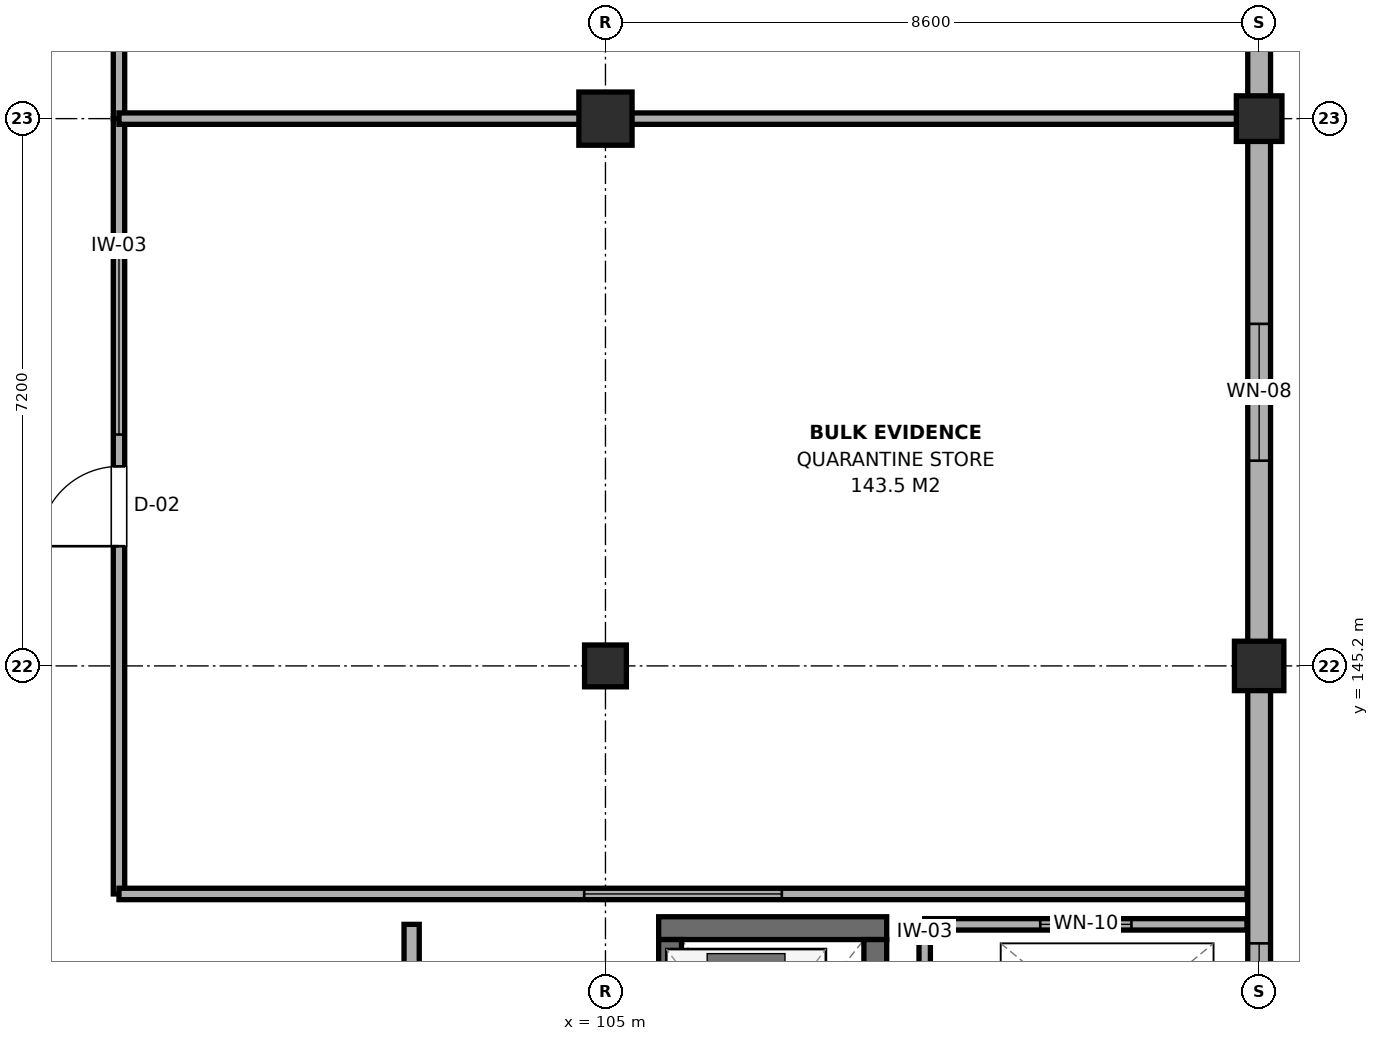
"""IFC4 building model, lengths in metres.
Left out: names, types, materials, properties, quantities, classifications, styles, units other than length and angle.
Written with IfcOpenShell. Run it as: python <this file> out.ifc"""

import sys

from ifc_helpers import new_model, si_unit, direction, frame, frame_2d, origin, origin_2d, place, context, subcontext, project, spatial, rectangle, extrude, element, fill, save


model = new_model("IFC4")
c1 = context("Model", 3, precision=1e-05, world=origin(), true_north=direction((0.0, 1.0)))
c2 = subcontext(c1, "Body", "Model", "MODEL_VIEW")
j1 = project(units=[si_unit("LENGTHUNIT", "METRE"), si_unit("PLANEANGLEUNIT", "RADIAN")], contexts=[c1])
p1 = place(None, origin())
s1 = spatial("IfcSite", under=j1, at=p1, CompositionType="ELEMENT")
p2 = place(p1, origin())
s2 = spatial("IfcBuilding", under=s1, at=p2, CompositionType="ELEMENT")
p3 = place(p2, origin())
s3 = spatial("IfcBuildingStorey", under=s2, at=p3, CompositionType="ELEMENT", Elevation=0.0)
p4 = place(p3, frame((105.0, 145.2, 0.0), z_axis=(0.0, 0.0, 1.0), x_axis=(1.0, 0.0, 0.0)))
e1 = element("IfcColumn", 1, at=p4, inside=s3, PredefinedType="COLUMN", context=c2, shape_type="SweptSolid", body=[
    extrude(rectangle(XDim=0.55, YDim=0.55, at=origin_2d()), origin(), (0.0, 0.0, 1.0), 4.8),
])
p5 = place(p3, frame((105.0, 152.4, 0.0), z_axis=(0.0, 0.0, 1.0), x_axis=(1.0, 0.0, 0.0)))
e2 = element("IfcColumn", 2, at=p5, inside=s3, PredefinedType="COLUMN", context=c2, shape_type="SweptSolid", body=[
    extrude(rectangle(XDim=0.7, YDim=0.7, at=origin_2d()), origin(), (0.0, 0.0, 1.0), 4.8),
])
p6 = place(p3, frame((113.6, 145.2, 0.0), z_axis=(0.0, 0.0, 1.0), x_axis=(1.0, 0.0, 0.0)))
e3 = element("IfcColumn", 3, at=p6, inside=s3, PredefinedType="COLUMN", context=c2, shape_type="SweptSolid", body=[
    extrude(rectangle(XDim=0.65, YDim=0.65, at=origin_2d()), origin(), (0.0, 0.0, 1.0), 4.8),
])
p7 = place(p3, frame((113.6, 152.4, 0.0), z_axis=(0.0, 0.0, 1.0), x_axis=(1.0, 0.0, 0.0)))
e4 = element("IfcColumn", 4, at=p7, inside=s3, PredefinedType="COLUMN", context=c2, shape_type="SweptSolid", body=[
    extrude(rectangle(XDim=0.6, YDim=0.6, at=origin_2d()), origin(), (0.0, 0.0, 1.0), 4.8),
])
p8 = place(p3, frame((105.7, 141.75, 0.0), z_axis=(0.0, 0.0, 1.0), x_axis=(1.0, 0.0, 0.0)))
e5 = element("IfcWall", 5, at=p8, inside=s3, PredefinedType="SHEAR", context=c2, shape_type="SweptSolid", body=[
    extrude(rectangle(XDim=3.0, YDim=0.3, at=frame_2d((1.5, 0.0))), origin(), (0.0, 0.0, 1.0), 4.56),
])
p9 = place(p3, frame((105.85, 138.6, 0.0), z_axis=(0.0, 0.0, 1.0), x_axis=(0.0, 1.0, 0.0)))
e6 = element("IfcWall", 6, at=p9, inside=s3, PredefinedType="SHEAR", context=c2, shape_type="SweptSolid", body=[
    extrude(rectangle(XDim=3.0, YDim=0.3, at=frame_2d((1.5, 0.0))), origin(), (0.0, 0.0, 1.0), 4.56),
])
p10 = place(p9, frame((0.925, 0.0, 0.0)))
e7 = element("IfcOpeningElement", 7, at=p10, cuts=e6, PredefinedType="OPENING", context=c2, shape_type="SweptSolid", body=[
    extrude(rectangle(XDim=1.15, YDim=2.15, at=frame_2d((0.575, 1.075))), frame((0.0, 0.165, 0.0), z_axis=(0.0, -1.0, 0.0), x_axis=(1.0, 0.0, 0.0)), (0.0, 0.0, 1.0), 0.33),
])
p11 = place(p3, frame((108.55, 138.6, 0.0), z_axis=(0.0, 0.0, 1.0), x_axis=(0.0, 1.0, 0.0)))
e8 = element("IfcWall", 8, at=p11, inside=s3, PredefinedType="SHEAR", context=c2, shape_type="SweptSolid", body=[
    extrude(rectangle(XDim=3.0, YDim=0.3, at=frame_2d((1.5, 0.0))), origin(), (0.0, 0.0, 1.0), 4.56),
])
p12 = place(p3, frame((113.6, 138.0, 0.0), z_axis=(0.0, 0.0, 1.0), x_axis=(0.0, 1.0, 0.0)))
e9 = element("IfcWall", 9, at=p12, inside=s3, PredefinedType="SOLIDWALL", context=c2, shape_type="SweptSolid", body=[
    extrude(rectangle(XDim=7.2, YDim=0.3, at=frame_2d((3.6, 0.0))), origin(), (0.0, 0.0, 1.0), 3.955),
])
p13 = place(p12, frame((1.75, 0.0, 1.1)))
e10 = element("IfcOpeningElement", 10, at=p13, cuts=e9, PredefinedType="OPENING", context=c2, shape_type="SweptSolid", body=[
    extrude(rectangle(XDim=1.8, YDim=1.2, at=frame_2d((0.9, 0.6))), frame((0.0, 0.165, 0.0), z_axis=(0.0, -1.0, 0.0), x_axis=(1.0, 0.0, 0.0)), (0.0, 0.0, 1.0), 0.33),
])
p14 = place(p3, frame((113.6, 145.2, 0.0), z_axis=(0.0, 0.0, 1.0), x_axis=(0.0, 1.0, 0.0)))
e11 = element("IfcWall", 11, at=p14, inside=s3, PredefinedType="SOLIDWALL", context=c2, shape_type="SweptSolid", body=[
    extrude(rectangle(XDim=7.2, YDim=0.3, at=frame_2d((3.6, 0.0))), origin(), (0.0, 0.0, 1.0), 4.005),
])
p15 = place(p14, frame((2.7, 0.0, 1.1)))
e12 = element("IfcOpeningElement", 12, at=p15, cuts=e11, PredefinedType="OPENING", context=c2, shape_type="SweptSolid", body=[
    extrude(rectangle(XDim=1.8, YDim=1.2, at=frame_2d((0.9, 0.6))), frame((0.0, 0.165, 0.0), z_axis=(0.0, -1.0, 0.0), x_axis=(1.0, 0.0, 0.0)), (0.0, 0.0, 1.0), 0.33),
])
p16 = place(p3, frame((113.6, 152.4, 0.0), z_axis=(0.0, 0.0, 1.0), x_axis=(0.0, 1.0, 0.0)))
e13 = element("IfcWall", 13, at=p16, inside=s3, PredefinedType="SOLIDWALL", context=c2, shape_type="SweptSolid", body=[
    extrude(rectangle(XDim=7.2, YDim=0.3, at=frame_2d((3.6, 0.0))), origin(), (0.0, 0.0, 1.0), 4.055),
])
p17 = place(p16, frame((2.7, 0.0, 1.1)))
e14 = element("IfcOpeningElement", 14, at=p17, cuts=e13, PredefinedType="OPENING", context=c2, shape_type="SweptSolid", body=[
    extrude(rectangle(XDim=1.8, YDim=1.2, at=frame_2d((0.9, 0.6))), frame((0.0, 0.165, 0.0), z_axis=(0.0, -1.0, 0.0), x_axis=(1.0, 0.0, 0.0)), (0.0, 0.0, 1.0), 0.33),
])
p18 = place(p3, frame((102.45, 131.5, 0.0), z_axis=(0.0, 0.0, 1.0), x_axis=(0.0, 1.0, 0.0)))
e15 = element("IfcWall", 15, at=p18, inside=s3, PredefinedType="PARTITIONING", context=c2, shape_type="SweptSolid", body=[
    extrude(rectangle(XDim=10.3, YDim=0.2, at=frame_2d((5.15, 0.0))), origin(), (0.0, 0.0, 1.0), 4.205),
])
p19 = place(p18, frame((2.65, 0.0, 0.0)))
e16 = element("IfcOpeningElement", 16, at=p19, cuts=e15, PredefinedType="OPENING", context=c2, shape_type="SweptSolid", body=[
    extrude(rectangle(XDim=1.1, YDim=2.15, at=frame_2d((0.55, 1.075))), frame((0.0, 0.115, 0.0), z_axis=(0.0, -1.0, 0.0), x_axis=(1.0, 0.0, 0.0)), (0.0, 0.0, 1.0), 0.23),
])
p20 = place(p18, frame((6.116, 0.0, 0.95)))
e17 = element("IfcOpeningElement", 17, at=p20, cuts=e15, PredefinedType="OPENING", context=c2, shape_type="SweptSolid", body=[
    extrude(rectangle(XDim=2.6, YDim=1.5, at=frame_2d((1.3, 0.75))), frame((0.0, 0.115, 0.0), z_axis=(0.0, -1.0, 0.0), x_axis=(1.0, 0.0, 0.0)), (0.0, 0.0, 1.0), 0.23),
])
p21 = place(p3, frame((109.2, 141.8, 0.0), z_axis=(0.0, 0.0, 1.0), x_axis=(1.0, 0.0, 0.0)))
e18 = element("IfcWall", 18, at=p21, inside=s3, PredefinedType="PARTITIONING", context=c2, shape_type="SweptSolid", body=[
    extrude(rectangle(XDim=4.24, YDim=0.15, at=frame_2d((2.12, 0.0))), origin(), (0.0, 0.0, 1.0), 3.955),
])
p22 = place(p21, frame((1.52, 0.0, 0.95)))
e19 = element("IfcOpeningElement", 19, at=p22, cuts=e18, PredefinedType="OPENING", context=c2, shape_type="SweptSolid", body=[
    extrude(rectangle(XDim=1.2, YDim=1.5, at=frame_2d((0.6, 0.75))), frame((0.0, 0.09, 0.0), z_axis=(0.0, -1.0, 0.0), x_axis=(1.0, 0.0, 0.0)), (0.0, 0.0, 1.0), 0.18),
])
p23 = place(p3, frame((109.2, 139.0, 0.0), z_axis=(0.0, 0.0, 1.0), x_axis=(0.0, 1.0, 0.0)))
e20 = element("IfcWall", 20, at=p23, inside=s3, PredefinedType="PARTITIONING", context=c2, shape_type="SweptSolid", body=[
    extrude(rectangle(XDim=2.8, YDim=0.15, at=frame_2d((1.4, 0.0))), origin(), (0.0, 0.0, 1.0), 4.555),
])
p24 = place(p23, frame((0.975, 0.0, 0.0)))
e21 = element("IfcOpeningElement", 21, at=p24, cuts=e20, PredefinedType="OPENING", context=c2, shape_type="SweptSolid", body=[
    extrude(rectangle(XDim=0.85, YDim=2.1, at=frame_2d((0.425, 1.05))), frame((0.0, 0.09, 0.0), z_axis=(0.0, -1.0, 0.0), x_axis=(1.0, 0.0, 0.0)), (0.0, 0.0, 1.0), 0.18),
])
p25 = place(p3, frame((98.6, 142.2, 0.0), z_axis=(0.0, 0.0, 1.0), x_axis=(0.0, 1.0, 0.0)))
e22 = element("IfcWall", 22, at=p25, inside=s3, PredefinedType="PARTITIONING", context=c2, shape_type="SweptSolid", body=[
    extrude(rectangle(XDim=10.2, YDim=0.15, at=frame_2d((5.1, 0.0))), origin(), (0.0, 0.0, 1.0), 4.065),
])
p26 = place(p25, frame((4.575, 0.0, 0.0)))
e23 = element("IfcOpeningElement", 23, at=p26, cuts=e22, PredefinedType="OPENING", context=c2, shape_type="SweptSolid", body=[
    extrude(rectangle(XDim=1.05, YDim=2.15, at=frame_2d((0.525, 1.075))), frame((0.0, 0.09, 0.0), z_axis=(0.0, -1.0, 0.0), x_axis=(1.0, 0.0, 0.0)), (0.0, 0.0, 1.0), 0.18),
])
p27 = place(p25, frame((6.044, 0.0, 0.95)))
e24 = element("IfcOpeningElement", 24, at=p27, cuts=e22, PredefinedType="OPENING", context=c2, shape_type="SweptSolid", body=[
    extrude(rectangle(XDim=2.6, YDim=1.5, at=frame_2d((1.3, 0.75))), frame((0.0, 0.09, 0.0), z_axis=(0.0, -1.0, 0.0), x_axis=(1.0, 0.0, 0.0)), (0.0, 0.0, 1.0), 0.18),
])
p28 = place(p3, frame((98.6, 142.2, 0.0), z_axis=(0.0, 0.0, 1.0), x_axis=(1.0, 0.0, 0.0)))
e25 = element("IfcWall", 25, at=p28, inside=s3, PredefinedType="PARTITIONING", context=c2, shape_type="SweptSolid", body=[
    extrude(rectangle(XDim=14.84, YDim=0.15, at=frame_2d((7.42, 0.0))), origin(), (0.0, 0.0, 1.0), 3.955),
])
p29 = place(p28, frame((6.12, 0.0, 0.95)))
e26 = element("IfcOpeningElement", 26, at=p29, cuts=e25, PredefinedType="OPENING", context=c2, shape_type="SweptSolid", body=[
    extrude(rectangle(XDim=2.6, YDim=1.5, at=frame_2d((1.3, 0.75))), frame((0.0, 0.09, 0.0), z_axis=(0.0, -1.0, 0.0), x_axis=(1.0, 0.0, 0.0)), (0.0, 0.0, 1.0), 0.18),
])
p30 = place(p3, frame((98.6, 152.4, 0.0), z_axis=(0.0, 0.0, 1.0), x_axis=(0.0, 1.0, 0.0)))
e27 = element("IfcWall", 27, at=p30, inside=s3, PredefinedType="PARTITIONING", context=c2, shape_type="SweptSolid", body=[
    extrude(rectangle(XDim=3.407, YDim=0.15, at=frame_2d((1.704, 0.0))), origin(), (0.0, 0.0, 1.0), 4.065),
])
p31 = place(p30, frame((1.228, 0.0, 0.0)))
e28 = element("IfcOpeningElement", 28, at=p31, cuts=e27, PredefinedType="OPENING", context=c2, shape_type="SweptSolid", body=[
    extrude(rectangle(XDim=0.95, YDim=2.15, at=frame_2d((0.475, 1.075))), frame((0.0, 0.09, 0.0), z_axis=(0.0, -1.0, 0.0), x_axis=(1.0, 0.0, 0.0)), (0.0, 0.0, 1.0), 0.18),
])
p32 = place(p3, frame((98.6, 152.4, 0.0), z_axis=(0.0, 0.0, 1.0), x_axis=(1.0, 0.0, 0.0)))
e29 = element("IfcWall", 29, at=p32, inside=s3, PredefinedType="PARTITIONING", context=c2, shape_type="SweptSolid", body=[
    extrude(rectangle(XDim=14.84, YDim=0.15, at=frame_2d((7.42, 0.0))), origin(), (0.0, 0.0, 1.0), 4.065),
])
p33 = place(p13, origin())
e30 = element("IfcWindow", 30, at=p33, inside=s3, PartitioningType="SINGLE_PANEL", PredefinedType="WINDOW", context=c2, shape_type="SweptSolid", body=[
    extrude(rectangle(XDim=1.8, YDim=1.2, at=frame_2d((0.9, 0.6))), frame((0.0, 0.03, 0.0), z_axis=(0.0, -1.0, 0.0), x_axis=(1.0, 0.0, 0.0)), (0.0, 0.0, 1.0), 0.06),
])
fill(e10, e30)
p34 = place(p15, origin())
e31 = element("IfcWindow", 31, at=p34, inside=s3, PartitioningType="SINGLE_PANEL", PredefinedType="WINDOW", context=c2, shape_type="SweptSolid", body=[
    extrude(rectangle(XDim=1.8, YDim=1.2, at=frame_2d((0.9, 0.6))), frame((0.0, 0.03, 0.0), z_axis=(0.0, -1.0, 0.0), x_axis=(1.0, 0.0, 0.0)), (0.0, 0.0, 1.0), 0.06),
])
fill(e12, e31)
p35 = place(p22, origin())
e32 = element("IfcWindow", 32, at=p35, inside=s3, PartitioningType="SINGLE_PANEL", PredefinedType="WINDOW", context=c2, shape_type="SweptSolid", body=[
    extrude(rectangle(XDim=1.2, YDim=1.5, at=frame_2d((0.6, 0.75))), frame((0.0, 0.03, 0.0), z_axis=(0.0, -1.0, 0.0), x_axis=(1.0, 0.0, 0.0)), (0.0, 0.0, 1.0), 0.06),
])
fill(e19, e32)
p36 = place(p26, origin())
e33 = element("IfcDoor", 33, at=p36, inside=s3, OperationType="SINGLE_SWING_LEFT", PredefinedType="DOOR", context=c2, shape_type="SweptSolid", body=[
    extrude(rectangle(XDim=1.05, YDim=2.15, at=frame_2d((0.525, 1.075))), frame((0.0, 0.025, 0.0), z_axis=(0.0, -1.0, 0.0), x_axis=(1.0, 0.0, 0.0)), (0.0, 0.0, 1.0), 0.05),
])
fill(e23, e33)
p37 = place(p27, origin())
e34 = element("IfcWindow", 34, at=p37, inside=s3, PartitioningType="SINGLE_PANEL", PredefinedType="WINDOW", context=c2, shape_type="SweptSolid", body=[
    extrude(rectangle(XDim=2.6, YDim=1.5, at=frame_2d((1.3, 0.75))), frame((0.0, 0.03, 0.0), z_axis=(0.0, -1.0, 0.0), x_axis=(1.0, 0.0, 0.0)), (0.0, 0.0, 1.0), 0.06),
])
fill(e24, e34)
p38 = place(p29, origin())
e35 = element("IfcWindow", 35, at=p38, inside=s3, PartitioningType="SINGLE_PANEL", PredefinedType="WINDOW", context=c2, shape_type="SweptSolid", body=[
    extrude(rectangle(XDim=2.6, YDim=1.5, at=frame_2d((1.3, 0.75))), frame((0.0, 0.03, 0.0), z_axis=(0.0, -1.0, 0.0), x_axis=(1.0, 0.0, 0.0)), (0.0, 0.0, 1.0), 0.06),
])
fill(e26, e35)
save(model, sys.argv[1])
